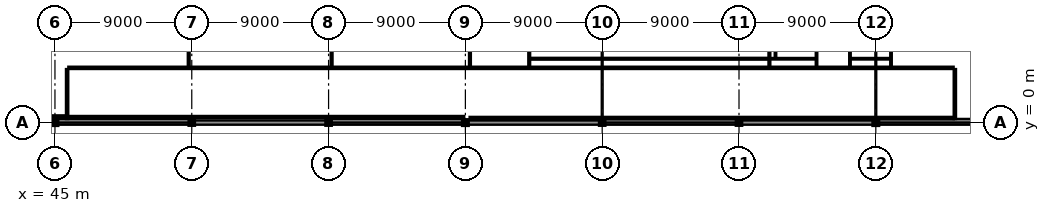
"""IFC4 building model, lengths in metres.
Left out: names, types, materials, properties, quantities, classifications, styles, units other than length and angle.
Written with IfcOpenShell. Run it as: python <this file> out.ifc"""

import sys

from ifc_helpers import new_model, si_unit, direction, frame, frame_2d, origin, origin_2d, place, context, subcontext, project, spatial, rectangle, i_section, extrude, element, fill, save


model = new_model("IFC4")
c1 = context("Model", 3, precision=1e-05, world=origin(), true_north=direction((0.0, 1.0)))
c2 = subcontext(c1, "Body", "Model", "MODEL_VIEW")
j1 = project(units=[si_unit("LENGTHUNIT", "METRE"), si_unit("PLANEANGLEUNIT", "RADIAN")], contexts=[c1])
p1 = place(None, origin())
s1 = spatial("IfcSite", under=j1, at=p1, CompositionType="ELEMENT")
p2 = place(p1, origin())
s2 = spatial("IfcBuilding", under=s1, at=p2, CompositionType="ELEMENT")
p3 = place(p2, frame((0.0, 0.0, 35.4)))
s3 = spatial("IfcBuildingStorey", under=s2, at=p3, CompositionType="ELEMENT", Elevation=35.4)
p4 = place(p3, frame((45.0, 0.0, 0.0), z_axis=(0.0, 0.0, 1.0), x_axis=(0.0, 1.0, 0.0)))
e1 = element("IfcColumn", 1, at=p4, inside=s3, PredefinedType="COLUMN", context=c2, shape_type="SweptSolid", body=[
    extrude(i_section(OverallWidth=0.28, OverallDepth=0.28, WebThickness=0.01, FlangeThickness=0.018, at=origin_2d()), origin(), (0.0, 0.0, 1.0), 3.8),
])
for number, where, z_axis, x_axis in (
    (2, (54.0, 0.0, 0.0), (0.0, 0.0, 1.0), (1.0, 0.0, 0.0)),
    (3, (63.0, 0.0, 0.0), (0.0, 0.0, 1.0), (1.0, 0.0, 0.0)),
):
    element("IfcColumn", number, at=place(p3, frame(where, z_axis=z_axis, x_axis=x_axis)), inside=s3, PredefinedType="COLUMN", context=c2, shape_type="SweptSolid", body=[
        extrude(i_section(OverallWidth=0.26, OverallDepth=0.26, WebThickness=0.01, FlangeThickness=0.018, at=origin_2d()), origin(), (0.0, 0.0, 1.0), 3.8),
    ])
p5 = place(p3, frame((72.0, 0.0, 0.0), z_axis=(0.0, 0.0, 1.0), x_axis=(1.0, 0.0, 0.0)))
e4 = element("IfcColumn", 4, at=p5, inside=s3, PredefinedType="COLUMN", context=c2, shape_type="SweptSolid", body=[
    extrude(i_section(OverallWidth=0.28, OverallDepth=0.28, WebThickness=0.01, FlangeThickness=0.018, at=origin_2d()), origin(), (0.0, 0.0, 1.0), 3.8),
])
for number, where, z_axis, x_axis in (
    (5, (81.0, 0.0, 0.0), (0.0, 0.0, 1.0), (1.0, 0.0, 0.0)),
    (6, (90.0, 0.0, 0.0), (0.0, 0.0, 1.0), (0.0, 1.0, 0.0)),
):
    element("IfcColumn", number, at=place(p3, frame(where, z_axis=z_axis, x_axis=x_axis)), inside=s3, PredefinedType="COLUMN", context=c2, shape_type="SweptSolid", body=[
        extrude(i_section(OverallWidth=0.26, OverallDepth=0.26, WebThickness=0.01, FlangeThickness=0.018, at=origin_2d()), origin(), (0.0, 0.0, 1.0), 3.8),
    ])
p6 = place(p3, frame((99.0, 0.0, 0.0), z_axis=(0.0, 0.0, 1.0), x_axis=(1.0, 0.0, 0.0)))
e7 = element("IfcColumn", 7, at=p6, inside=s3, PredefinedType="COLUMN", context=c2, shape_type="SweptSolid", body=[
    extrude(i_section(OverallWidth=0.28, OverallDepth=0.28, WebThickness=0.01, FlangeThickness=0.018, at=origin_2d()), origin(), (0.0, 0.0, 1.0), 3.8),
])
p7 = place(p3, frame((35.99, 0.0, 0.0), z_axis=(0.0, 0.0, 1.0), x_axis=(1.0, 0.0, 0.0)))
e8 = element("IfcWall", 8, at=p7, inside=s3, PredefinedType="SOLIDWALL", context=c2, shape_type="SweptSolid", body=[
    extrude(rectangle(XDim=8.872, YDim=0.28, at=frame_2d((4.436, 0.0))), origin(), (0.0, 0.0, 1.0), 2.787),
])
p8 = place(p3, frame((45.138, 0.0, 0.0), z_axis=(0.0, 0.0, 1.0), x_axis=(1.0, 0.0, 0.0)))
e9 = element("IfcWall", 9, at=p8, inside=s3, PredefinedType="SOLIDWALL", context=c2, shape_type="SweptSolid", body=[
    extrude(rectangle(XDim=8.854, YDim=0.28, at=frame_2d((4.427, 0.0))), origin(), (0.0, 0.0, 1.0), 2.787),
])
p9 = place(p8, frame((2.006, 0.0, 1.05)))
e10 = element("IfcOpeningElement", 10, at=p9, cuts=e9, PredefinedType="OPENING", context=c2, shape_type="SweptSolid", body=[
    extrude(rectangle(XDim=1.3, YDim=1.3, at=frame_2d((0.65, 0.65))), frame((0.0, 0.155, 0.0), z_axis=(0.0, -1.0, 0.0), x_axis=(1.0, 0.0, 0.0)), (0.0, 0.0, 1.0), 0.31),
])
p10 = place(p8, frame((5.548, 0.0, 1.05)))
e11 = element("IfcOpeningElement", 11, at=p10, cuts=e9, PredefinedType="OPENING", context=c2, shape_type="SweptSolid", body=[
    extrude(rectangle(XDim=1.3, YDim=1.3, at=frame_2d((0.65, 0.65))), frame((0.0, 0.155, 0.0), z_axis=(0.0, -1.0, 0.0), x_axis=(1.0, 0.0, 0.0)), (0.0, 0.0, 1.0), 0.31),
])
p11 = place(p3, frame((54.008, 0.0, 0.0), z_axis=(0.0, 0.0, 1.0), x_axis=(1.0, 0.0, 0.0)))
e12 = element("IfcWall", 12, at=p11, inside=s3, PredefinedType="SOLIDWALL", context=c2, shape_type="SweptSolid", body=[
    extrude(rectangle(XDim=8.984, YDim=0.28, at=frame_2d((4.492, 0.0))), origin(), (0.0, 0.0, 1.0), 2.787),
])
p12 = place(p11, frame((2.045, 0.0, 1.05)))
e13 = element("IfcOpeningElement", 13, at=p12, cuts=e12, PredefinedType="OPENING", context=c2, shape_type="SweptSolid", body=[
    extrude(rectangle(XDim=1.3, YDim=1.3, at=frame_2d((0.65, 0.65))), frame((0.0, 0.155, 0.0), z_axis=(0.0, -1.0, 0.0), x_axis=(1.0, 0.0, 0.0)), (0.0, 0.0, 1.0), 0.31),
])
p13 = place(p11, frame((5.639, 0.0, 1.05)))
e14 = element("IfcOpeningElement", 14, at=p13, cuts=e12, PredefinedType="OPENING", context=c2, shape_type="SweptSolid", body=[
    extrude(rectangle(XDim=1.3, YDim=1.3, at=frame_2d((0.65, 0.65))), frame((0.0, 0.155, 0.0), z_axis=(0.0, -1.0, 0.0), x_axis=(1.0, 0.0, 0.0)), (0.0, 0.0, 1.0), 0.31),
])
p14 = place(p3, frame((63.008, 0.0, 0.0), z_axis=(0.0, 0.0, 1.0), x_axis=(1.0, 0.0, 0.0)))
e15 = element("IfcWall", 15, at=p14, inside=s3, PredefinedType="SOLIDWALL", context=c2, shape_type="SweptSolid", body=[
    extrude(rectangle(XDim=8.984, YDim=0.28, at=frame_2d((4.492, 0.0))), origin(), (0.0, 0.0, 1.0), 2.787),
])
p15 = place(p14, frame((2.045, 0.0, 1.05)))
e16 = element("IfcOpeningElement", 16, at=p15, cuts=e15, PredefinedType="OPENING", context=c2, shape_type="SweptSolid", body=[
    extrude(rectangle(XDim=1.3, YDim=1.3, at=frame_2d((0.65, 0.65))), frame((0.0, 0.155, 0.0), z_axis=(0.0, -1.0, 0.0), x_axis=(1.0, 0.0, 0.0)), (0.0, 0.0, 1.0), 0.31),
])
p16 = place(p14, frame((5.639, 0.0, 1.05)))
e17 = element("IfcOpeningElement", 17, at=p16, cuts=e15, PredefinedType="OPENING", context=c2, shape_type="SweptSolid", body=[
    extrude(rectangle(XDim=1.3, YDim=1.3, at=frame_2d((0.65, 0.65))), frame((0.0, 0.155, 0.0), z_axis=(0.0, -1.0, 0.0), x_axis=(1.0, 0.0, 0.0)), (0.0, 0.0, 1.0), 0.31),
])
p17 = place(p3, frame((72.008, 0.0, 0.0), z_axis=(0.0, 0.0, 1.0), x_axis=(1.0, 0.0, 0.0)))
e18 = element("IfcWall", 18, at=p17, inside=s3, PredefinedType="SOLIDWALL", context=c2, shape_type="SweptSolid", body=[
    extrude(rectangle(XDim=8.934, YDim=0.28, at=frame_2d((4.467, 0.0))), origin(), (0.0, 0.0, 1.0), 3.305),
])
p18 = place(p17, frame((2.03, 0.0, 1.05)))
e19 = element("IfcOpeningElement", 19, at=p18, cuts=e18, PredefinedType="OPENING", context=c2, shape_type="SweptSolid", body=[
    extrude(rectangle(XDim=1.3, YDim=1.3, at=frame_2d((0.65, 0.65))), frame((0.0, 0.155, 0.0), z_axis=(0.0, -1.0, 0.0), x_axis=(1.0, 0.0, 0.0)), (0.0, 0.0, 1.0), 0.31),
])
p19 = place(p17, frame((5.604, 0.0, 1.05)))
e20 = element("IfcOpeningElement", 20, at=p19, cuts=e18, PredefinedType="OPENING", context=c2, shape_type="SweptSolid", body=[
    extrude(rectangle(XDim=1.3, YDim=1.3, at=frame_2d((0.65, 0.65))), frame((0.0, 0.155, 0.0), z_axis=(0.0, -1.0, 0.0), x_axis=(1.0, 0.0, 0.0)), (0.0, 0.0, 1.0), 0.31),
])
p20 = place(p3, frame((81.058, 0.0, 0.0), z_axis=(0.0, 0.0, 1.0), x_axis=(1.0, 0.0, 0.0)))
e21 = element("IfcWall", 21, at=p20, inside=s3, PredefinedType="SOLIDWALL", context=c2, shape_type="SweptSolid", body=[
    extrude(rectangle(XDim=8.814, YDim=0.28, at=frame_2d((4.407, 0.0))), origin(), (0.0, 0.0, 1.0), 3.305),
])
p21 = place(p20, frame((1.994, 0.0, 1.05)))
e22 = element("IfcOpeningElement", 22, at=p21, cuts=e21, PredefinedType="OPENING", context=c2, shape_type="SweptSolid", body=[
    extrude(rectangle(XDim=1.3, YDim=1.3, at=frame_2d((0.65, 0.65))), frame((0.0, 0.155, 0.0), z_axis=(0.0, -1.0, 0.0), x_axis=(1.0, 0.0, 0.0)), (0.0, 0.0, 1.0), 0.31),
])
p22 = place(p20, frame((5.52, 0.0, 1.05)))
e23 = element("IfcOpeningElement", 23, at=p22, cuts=e21, PredefinedType="OPENING", context=c2, shape_type="SweptSolid", body=[
    extrude(rectangle(XDim=1.3, YDim=1.3, at=frame_2d((0.65, 0.65))), frame((0.0, 0.155, 0.0), z_axis=(0.0, -1.0, 0.0), x_axis=(1.0, 0.0, 0.0)), (0.0, 0.0, 1.0), 0.31),
])
p23 = place(p3, frame((90.128, 0.0, 0.0), z_axis=(0.0, 0.0, 1.0), x_axis=(1.0, 0.0, 0.0)))
e24 = element("IfcWall", 24, at=p23, inside=s3, PredefinedType="SOLIDWALL", context=c2, shape_type="SweptSolid", body=[
    extrude(rectangle(XDim=8.814, YDim=0.28, at=frame_2d((4.407, 0.0))), origin(), (0.0, 0.0, 1.0), 3.305),
])
p24 = place(p23, frame((1.994, 0.0, 1.05)))
e25 = element("IfcOpeningElement", 25, at=p24, cuts=e24, PredefinedType="OPENING", context=c2, shape_type="SweptSolid", body=[
    extrude(rectangle(XDim=1.3, YDim=1.3, at=frame_2d((0.65, 0.65))), frame((0.0, 0.155, 0.0), z_axis=(0.0, -1.0, 0.0), x_axis=(1.0, 0.0, 0.0)), (0.0, 0.0, 1.0), 0.31),
])
p25 = place(p23, frame((5.52, 0.0, 1.05)))
e26 = element("IfcOpeningElement", 26, at=p25, cuts=e24, PredefinedType="OPENING", context=c2, shape_type="SweptSolid", body=[
    extrude(rectangle(XDim=1.3, YDim=1.3, at=frame_2d((0.65, 0.65))), frame((0.0, 0.155, 0.0), z_axis=(0.0, -1.0, 0.0), x_axis=(1.0, 0.0, 0.0)), (0.0, 0.0, 1.0), 0.31),
])
p26 = place(p3, frame((99.058, 0.0, 0.0), z_axis=(0.0, 0.0, 1.0), x_axis=(1.0, 0.0, 0.0)))
e27 = element("IfcWall", 27, at=p26, inside=s3, PredefinedType="SOLIDWALL", context=c2, shape_type="SweptSolid", body=[
    extrude(rectangle(XDim=8.934, YDim=0.28, at=frame_2d((4.467, 0.0))), origin(), (0.0, 0.0, 1.0), 3.305),
])
p27 = place(p26, frame((2.03, 0.0, 1.05)))
e28 = element("IfcOpeningElement", 28, at=p27, cuts=e27, PredefinedType="OPENING", context=c2, shape_type="SweptSolid", body=[
    extrude(rectangle(XDim=1.3, YDim=1.3, at=frame_2d((0.65, 0.65))), frame((0.0, 0.155, 0.0), z_axis=(0.0, -1.0, 0.0), x_axis=(1.0, 0.0, 0.0)), (0.0, 0.0, 1.0), 0.31),
])
p28 = place(p26, frame((5.604, 0.0, 1.05)))
e29 = element("IfcOpeningElement", 29, at=p28, cuts=e27, PredefinedType="OPENING", context=c2, shape_type="SweptSolid", body=[
    extrude(rectangle(XDim=1.3, YDim=1.3, at=frame_2d((0.65, 0.65))), frame((0.0, 0.155, 0.0), z_axis=(0.0, -1.0, 0.0), x_axis=(1.0, 0.0, 0.0)), (0.0, 0.0, 1.0), 0.31),
])
for number, where, z_axis, x_axis in (
    (30, (45.06, 0.12, 3.8), (0.0, 0.0, 1.0), (1.0, 0.0, 0.0)),
    (31, (63.06, 0.12, 3.8), (0.0, 0.0, 1.0), (1.0, 0.0, 0.0)),
    (32, (81.06, 0.12, 3.8), (0.0, 0.0, 1.0), (1.0, 0.0, 0.0)),
    (33, (99.06, 0.12, 3.8), (0.0, 0.0, 1.0), (1.0, 0.0, 0.0)),
):
    element("IfcWall", number, at=place(p3, frame(where, z_axis=z_axis, x_axis=x_axis)), inside=s3, PredefinedType="PARAPET", context=c2, shape_type="SweptSolid", body=[
        extrude(rectangle(XDim=8.88, YDim=0.24, at=frame_2d((4.44, 0.0))), origin(), (0.0, 0.0, 1.0), 1.1),
    ])
p29 = place(p3, frame((71.92, 0.36, 0.0), z_axis=(0.0, 0.0, 1.0), x_axis=(-1.0, 0.0, 0.0)))
e34 = element("IfcWall", 34, at=p29, inside=s3, PredefinedType="PARTITIONING", context=c2, shape_type="SweptSolid", body=[
    extrude(rectangle(XDim=26.04, YDim=0.15, at=frame_2d((13.02, 0.0))), origin(), (0.0, 0.0, 1.0), 3.64),
])
p30 = place(p3, frame((45.8, 0.235, 0.0), z_axis=(0.0, 0.0, 1.0), x_axis=(0.0, 1.0, 0.0)))
e35 = element("IfcWall", 35, at=p30, inside=s3, PredefinedType="PARTITIONING", context=c2, shape_type="SweptSolid", body=[
    extrude(rectangle(XDim=3.285, YDim=0.15, at=frame_2d((1.643, 0.0))), origin(), (0.0, 0.0, 1.0), 3.64),
])
p31 = place(p3, frame((45.88, 3.6, 0.0), z_axis=(0.0, 0.0, 1.0), x_axis=(1.0, 0.0, 0.0)))
e36 = element("IfcWall", 36, at=p31, inside=s3, PredefinedType="PARTITIONING", context=c2, shape_type="SweptSolid", body=[
    extrude(rectangle(XDim=58.24, YDim=0.15, at=frame_2d((29.12, 0.0))), origin(), (0.0, 0.0, 1.0), 3.64),
])
p32 = place(p31, frame((27.795, 0.0, 0.0)))
e37 = element("IfcOpeningElement", 37, at=p32, cuts=e36, PredefinedType="OPENING", context=c2, shape_type="SweptSolid", body=[
    extrude(rectangle(XDim=1.05, YDim=2.25, at=frame_2d((0.525, 1.125))), frame((0.0, 0.09, 0.0), z_axis=(0.0, -1.0, 0.0), x_axis=(1.0, 0.0, 0.0)), (0.0, 0.0, 1.0), 0.18),
])
p33 = place(p3, frame((104.2, 3.52, 0.0), z_axis=(0.0, 0.0, 1.0), x_axis=(0.0, -1.0, 0.0)))
e38 = element("IfcWall", 38, at=p33, inside=s3, PredefinedType="PARTITIONING", context=c2, shape_type="SweptSolid", body=[
    extrude(rectangle(XDim=3.285, YDim=0.15, at=frame_2d((1.643, 0.0))), origin(), (0.0, 0.0, 1.0), 3.64),
])
p34 = place(p3, frame((104.13, 0.3, 0.0), z_axis=(0.0, 0.0, 1.0), x_axis=(-1.0, 0.0, 0.0)))
e39 = element("IfcWall", 39, at=p34, inside=s3, PredefinedType="PARTITIONING", context=c2, shape_type="SweptSolid", body=[
    extrude(rectangle(XDim=31.851, YDim=0.15, at=frame_2d((15.925, 0.0))), origin(), (0.0, 0.0, 1.0), 3.64),
])
p35 = place(p3, frame((53.8, 12.62, 0.0), z_axis=(0.0, 0.0, 1.0), x_axis=(0.0, -1.0, 0.0)))
e40 = element("IfcWall", 40, at=p35, inside=s3, PredefinedType="PARTITIONING", context=c2, shape_type="SweptSolid", body=[
    extrude(rectangle(XDim=8.95, YDim=0.12, at=frame_2d((4.475, 0.0))), origin(), (0.0, 0.0, 1.0), 3.305),
])
p36 = place(p3, frame((45.73, 0.4, 0.0), z_axis=(0.0, 0.0, 1.0), x_axis=(-1.0, 0.0, 0.0)))
e41 = element("IfcWall", 41, at=p36, inside=s3, PredefinedType="PARTITIONING", context=c2, shape_type="SweptSolid", body=[
    extrude(rectangle(XDim=13.195, YDim=0.15, at=frame_2d((6.598, 0.0))), origin(), (0.0, 0.0, 1.0), 3.64),
])
p37 = place(p3, frame((72.3, 11.42, 0.0), z_axis=(0.0, 0.0, 1.0), x_axis=(0.0, -1.0, 0.0)))
e42 = element("IfcWall", 42, at=p37, inside=s3, PredefinedType="PARTITIONING", context=c2, shape_type="SweptSolid", body=[
    extrude(rectangle(XDim=7.75, YDim=0.12, at=frame_2d((3.875, 0.0))), origin(), (0.0, 0.0, 1.0), 3.64),
])
p38 = place(p37, frame((3.4, 0.0, 0.0)))
e43 = element("IfcOpeningElement", 43, at=p38, cuts=e42, PredefinedType="OPENING", context=c2, shape_type="SweptSolid", body=[
    extrude(rectangle(XDim=0.95, YDim=2.15, at=frame_2d((0.475, 1.075))), frame((0.0, 0.075, 0.0), z_axis=(0.0, -1.0, 0.0), x_axis=(1.0, 0.0, 0.0)), (0.0, 0.0, 1.0), 0.15),
])
p39 = place(p3, frame((63.2, 3.67, 0.0), z_axis=(0.0, 0.0, 1.0), x_axis=(0.0, 1.0, 0.0)))
e44 = element("IfcWall", 44, at=p39, inside=s3, PredefinedType="PARTITIONING", context=c2, shape_type="SweptSolid", body=[
    extrude(rectangle(XDim=7.775, YDim=0.12, at=frame_2d((3.888, 0.0))), origin(), (0.0, 0.0, 1.0), 3.245),
])
p40 = place(p3, frame((91.92, 4.2, 0.0), z_axis=(0.0, 0.0, 1.0), x_axis=(-1.0, 0.0, 0.0)))
e45 = element("IfcWall", 45, at=p40, inside=s3, PredefinedType="PARTITIONING", context=c2, shape_type="SweptSolid", body=[
    extrude(rectangle(XDim=15.64, YDim=0.12, at=frame_2d((7.82, 0.0))), origin(), (0.0, 0.0, 1.0), 3.64),
])
for number, where, z_axis, x_axis in (
    (46, (76.2, 3.67, 0.0), (0.0, 0.0, 1.0), (0.0, 1.0, 0.0)),
    (47, (92.0, 15.32, 0.0), (0.0, 0.0, 1.0), (0.0, -1.0, 0.0)),
):
    element("IfcWall", number, at=place(p3, frame(where, z_axis=z_axis, x_axis=x_axis)), inside=s3, PredefinedType="PARTITIONING", context=c2, shape_type="SweptSolid", body=[
        extrude(rectangle(XDim=11.65, YDim=0.12, at=frame_2d((5.825, 0.0))), origin(), (0.0, 0.0, 1.0), 3.64),
    ])
p41 = place(p3, frame((95.02, 4.2, 0.0), z_axis=(0.0, 0.0, 1.0), x_axis=(-1.0, 0.0, 0.0)))
e48 = element("IfcWall", 48, at=p41, inside=s3, PredefinedType="PARTITIONING", context=c2, shape_type="SweptSolid", body=[
    extrude(rectangle(XDim=2.965, YDim=0.1, at=frame_2d((1.482, 0.0))), origin(), (0.0, 0.0, 1.0), 3.64),
])
p42 = place(p3, frame((92.4, 4.245, 0.0), z_axis=(0.0, 0.0, 1.0), x_axis=(0.0, 1.0, 0.0)))
e49 = element("IfcWall", 49, at=p42, inside=s3, PredefinedType="PARTITIONING", context=c2, shape_type="SweptSolid", body=[
    extrude(rectangle(XDim=5.475, YDim=0.1, at=frame_2d((2.737, 0.0))), origin(), (0.0, 0.0, 1.0), 3.64),
])
p43 = place(p3, frame((95.1, 9.72, 0.0), z_axis=(0.0, 0.0, 1.0), x_axis=(0.0, -1.0, 0.0)))
e50 = element("IfcWall", 50, at=p43, inside=s3, PredefinedType="PARTITIONING", context=c2, shape_type="SweptSolid", body=[
    extrude(rectangle(XDim=6.05, YDim=0.1, at=frame_2d((3.025, 0.0))), origin(), (0.0, 0.0, 1.0), 3.64),
])
p44 = place(p43, frame((2.529, 0.0, 0.0)))
e51 = element("IfcOpeningElement", 51, at=p44, cuts=e50, PredefinedType="OPENING", context=c2, shape_type="SweptSolid", body=[
    extrude(rectangle(XDim=0.9, YDim=2.05, at=frame_2d((0.45, 1.025))), frame((0.0, 0.065, 0.0), z_axis=(0.0, -1.0, 0.0), x_axis=(1.0, 0.0, 0.0)), (0.0, 0.0, 1.0), 0.13),
])
p45 = place(p3, frame((100.0, 9.62, 0.0), z_axis=(0.0, 0.0, 1.0), x_axis=(0.0, -1.0, 0.0)))
e52 = element("IfcWall", 52, at=p45, inside=s3, PredefinedType="PARTITIONING", context=c2, shape_type="SweptSolid", body=[
    extrude(rectangle(XDim=5.95, YDim=0.1, at=frame_2d((2.975, 0.0))), origin(), (0.0, 0.0, 1.0), 3.64),
])
p46 = place(p3, frame((99.955, 4.2, 0.0), z_axis=(0.0, 0.0, 1.0), x_axis=(-1.0, 0.0, 0.0)))
e53 = element("IfcWall", 53, at=p46, inside=s3, PredefinedType="PARTITIONING", context=c2, shape_type="SweptSolid", body=[
    extrude(rectangle(XDim=2.575, YDim=0.1, at=frame_2d((1.288, 0.0))), origin(), (0.0, 0.0, 1.0), 3.64),
])
p47 = place(p3, frame((97.3, 3.67, 0.0), z_axis=(0.0, 0.0, 1.0), x_axis=(0.0, 1.0, 0.0)))
e54 = element("IfcWall", 54, at=p47, inside=s3, PredefinedType="PARTITIONING", context=c2, shape_type="SweptSolid", body=[
    extrude(rectangle(XDim=5.95, YDim=0.1, at=frame_2d((2.975, 0.0))), origin(), (0.0, 0.0, 1.0), 3.64),
])
p48 = place(p47, frame((2.571, 0.0, 0.0)))
e55 = element("IfcOpeningElement", 55, at=p48, cuts=e54, PredefinedType="OPENING", context=c2, shape_type="SweptSolid", body=[
    extrude(rectangle(XDim=0.9, YDim=2.05, at=frame_2d((0.45, 1.025))), frame((0.0, 0.065, 0.0), z_axis=(0.0, -1.0, 0.0), x_axis=(1.0, 0.0, 0.0)), (0.0, 0.0, 1.0), 0.13),
])
p49 = place(p9, origin())
e56 = element("IfcWindow", 56, at=p49, inside=s3, PartitioningType="SINGLE_PANEL", PredefinedType="WINDOW", context=c2, shape_type="SweptSolid", body=[
    extrude(rectangle(XDim=1.3, YDim=1.3, at=frame_2d((0.65, 0.65))), frame((0.0, 0.03, 0.0), z_axis=(0.0, -1.0, 0.0), x_axis=(1.0, 0.0, 0.0)), (0.0, 0.0, 1.0), 0.06),
])
fill(e10, e56)
p50 = place(p10, origin())
e57 = element("IfcWindow", 57, at=p50, inside=s3, PartitioningType="SINGLE_PANEL", PredefinedType="WINDOW", context=c2, shape_type="SweptSolid", body=[
    extrude(rectangle(XDim=1.3, YDim=1.3, at=frame_2d((0.65, 0.65))), frame((0.0, 0.03, 0.0), z_axis=(0.0, -1.0, 0.0), x_axis=(1.0, 0.0, 0.0)), (0.0, 0.0, 1.0), 0.06),
])
fill(e11, e57)
p51 = place(p12, origin())
e58 = element("IfcWindow", 58, at=p51, inside=s3, PartitioningType="SINGLE_PANEL", PredefinedType="WINDOW", context=c2, shape_type="SweptSolid", body=[
    extrude(rectangle(XDim=1.3, YDim=1.3, at=frame_2d((0.65, 0.65))), frame((0.0, 0.03, 0.0), z_axis=(0.0, -1.0, 0.0), x_axis=(1.0, 0.0, 0.0)), (0.0, 0.0, 1.0), 0.06),
])
fill(e13, e58)
p52 = place(p13, origin())
e59 = element("IfcWindow", 59, at=p52, inside=s3, PartitioningType="SINGLE_PANEL", PredefinedType="WINDOW", context=c2, shape_type="SweptSolid", body=[
    extrude(rectangle(XDim=1.3, YDim=1.3, at=frame_2d((0.65, 0.65))), frame((0.0, 0.03, 0.0), z_axis=(0.0, -1.0, 0.0), x_axis=(1.0, 0.0, 0.0)), (0.0, 0.0, 1.0), 0.06),
])
fill(e14, e59)
p53 = place(p15, origin())
e60 = element("IfcWindow", 60, at=p53, inside=s3, PartitioningType="SINGLE_PANEL", PredefinedType="WINDOW", context=c2, shape_type="SweptSolid", body=[
    extrude(rectangle(XDim=1.3, YDim=1.3, at=frame_2d((0.65, 0.65))), frame((0.0, 0.03, 0.0), z_axis=(0.0, -1.0, 0.0), x_axis=(1.0, 0.0, 0.0)), (0.0, 0.0, 1.0), 0.06),
])
fill(e16, e60)
p54 = place(p16, origin())
e61 = element("IfcWindow", 61, at=p54, inside=s3, PartitioningType="SINGLE_PANEL", PredefinedType="WINDOW", context=c2, shape_type="SweptSolid", body=[
    extrude(rectangle(XDim=1.3, YDim=1.3, at=frame_2d((0.65, 0.65))), frame((0.0, 0.03, 0.0), z_axis=(0.0, -1.0, 0.0), x_axis=(1.0, 0.0, 0.0)), (0.0, 0.0, 1.0), 0.06),
])
fill(e17, e61)
p55 = place(p18, origin())
e62 = element("IfcWindow", 62, at=p55, inside=s3, PartitioningType="SINGLE_PANEL", PredefinedType="WINDOW", context=c2, shape_type="SweptSolid", body=[
    extrude(rectangle(XDim=1.3, YDim=1.3, at=frame_2d((0.65, 0.65))), frame((0.0, 0.03, 0.0), z_axis=(0.0, -1.0, 0.0), x_axis=(1.0, 0.0, 0.0)), (0.0, 0.0, 1.0), 0.06),
])
fill(e19, e62)
p56 = place(p19, origin())
e63 = element("IfcWindow", 63, at=p56, inside=s3, PartitioningType="SINGLE_PANEL", PredefinedType="WINDOW", context=c2, shape_type="SweptSolid", body=[
    extrude(rectangle(XDim=1.3, YDim=1.3, at=frame_2d((0.65, 0.65))), frame((0.0, 0.03, 0.0), z_axis=(0.0, -1.0, 0.0), x_axis=(1.0, 0.0, 0.0)), (0.0, 0.0, 1.0), 0.06),
])
fill(e20, e63)
p57 = place(p21, origin())
e64 = element("IfcWindow", 64, at=p57, inside=s3, PartitioningType="SINGLE_PANEL", PredefinedType="WINDOW", context=c2, shape_type="SweptSolid", body=[
    extrude(rectangle(XDim=1.3, YDim=1.3, at=frame_2d((0.65, 0.65))), frame((0.0, 0.03, 0.0), z_axis=(0.0, -1.0, 0.0), x_axis=(1.0, 0.0, 0.0)), (0.0, 0.0, 1.0), 0.06),
])
fill(e22, e64)
p58 = place(p22, origin())
e65 = element("IfcWindow", 65, at=p58, inside=s3, PartitioningType="SINGLE_PANEL", PredefinedType="WINDOW", context=c2, shape_type="SweptSolid", body=[
    extrude(rectangle(XDim=1.3, YDim=1.3, at=frame_2d((0.65, 0.65))), frame((0.0, 0.03, 0.0), z_axis=(0.0, -1.0, 0.0), x_axis=(1.0, 0.0, 0.0)), (0.0, 0.0, 1.0), 0.06),
])
fill(e23, e65)
p59 = place(p24, origin())
e66 = element("IfcWindow", 66, at=p59, inside=s3, PartitioningType="SINGLE_PANEL", PredefinedType="WINDOW", context=c2, shape_type="SweptSolid", body=[
    extrude(rectangle(XDim=1.3, YDim=1.3, at=frame_2d((0.65, 0.65))), frame((0.0, 0.03, 0.0), z_axis=(0.0, -1.0, 0.0), x_axis=(1.0, 0.0, 0.0)), (0.0, 0.0, 1.0), 0.06),
])
fill(e25, e66)
p60 = place(p25, origin())
e67 = element("IfcWindow", 67, at=p60, inside=s3, PartitioningType="SINGLE_PANEL", PredefinedType="WINDOW", context=c2, shape_type="SweptSolid", body=[
    extrude(rectangle(XDim=1.3, YDim=1.3, at=frame_2d((0.65, 0.65))), frame((0.0, 0.03, 0.0), z_axis=(0.0, -1.0, 0.0), x_axis=(1.0, 0.0, 0.0)), (0.0, 0.0, 1.0), 0.06),
])
fill(e26, e67)
p61 = place(p27, origin())
e68 = element("IfcWindow", 68, at=p61, inside=s3, PartitioningType="SINGLE_PANEL", PredefinedType="WINDOW", context=c2, shape_type="SweptSolid", body=[
    extrude(rectangle(XDim=1.3, YDim=1.3, at=frame_2d((0.65, 0.65))), frame((0.0, 0.03, 0.0), z_axis=(0.0, -1.0, 0.0), x_axis=(1.0, 0.0, 0.0)), (0.0, 0.0, 1.0), 0.06),
])
fill(e28, e68)
p62 = place(p28, origin())
e69 = element("IfcWindow", 69, at=p62, inside=s3, PartitioningType="SINGLE_PANEL", PredefinedType="WINDOW", context=c2, shape_type="SweptSolid", body=[
    extrude(rectangle(XDim=1.3, YDim=1.3, at=frame_2d((0.65, 0.65))), frame((0.0, 0.03, 0.0), z_axis=(0.0, -1.0, 0.0), x_axis=(1.0, 0.0, 0.0)), (0.0, 0.0, 1.0), 0.06),
])
fill(e29, e69)
p63 = place(p32, origin())
e70 = element("IfcDoor", 70, at=p63, inside=s3, OperationType="SINGLE_SWING_LEFT", PredefinedType="DOOR", context=c2, shape_type="SweptSolid", body=[
    extrude(rectangle(XDim=1.05, YDim=2.25, at=frame_2d((0.525, 1.125))), frame((0.0, 0.025, 0.0), z_axis=(0.0, -1.0, 0.0), x_axis=(1.0, 0.0, 0.0)), (0.0, 0.0, 1.0), 0.05),
])
fill(e37, e70)
save(model, sys.argv[1])
